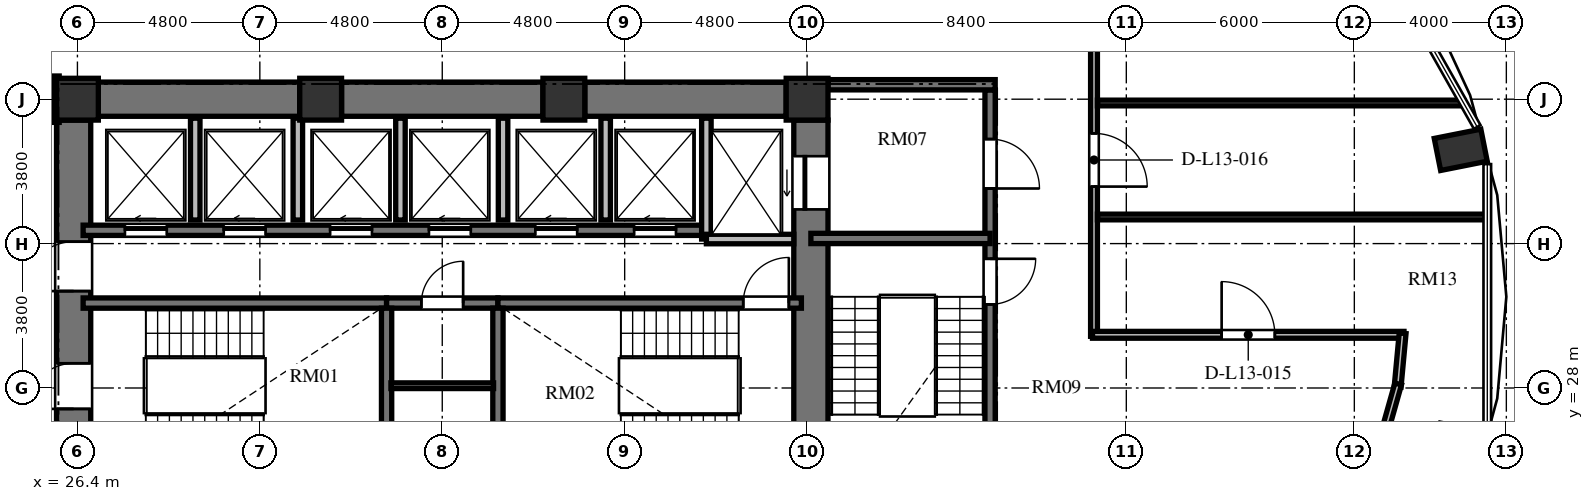
"""IFC4 building model, lengths in metres.
Left out: names, types, materials, properties, quantities, classifications, styles, units other than length and angle.
Written with IfcOpenShell. Run it as: python <this file> out.ifc"""

import sys

from ifc_helpers import new_model, si_unit, direction, frame, frame_2d, origin, origin_2d, place, context, subcontext, project, spatial, rectangle, extrude, element, fill, save


model = new_model("IFC4")
c1 = context("Model", 3, precision=1e-05, world=origin(), true_north=direction((0.0, 1.0)))
c2 = subcontext(c1, "Body", "Model", "MODEL_VIEW")
j1 = project(units=[si_unit("LENGTHUNIT", "METRE"), si_unit("PLANEANGLEUNIT", "RADIAN")], contexts=[c1])
p1 = place(None, origin())
s1 = spatial("IfcSite", under=j1, at=p1, CompositionType="ELEMENT")
p2 = place(p1, origin())
s2 = spatial("IfcBuilding", under=s1, at=p2, CompositionType="ELEMENT")
p3 = place(p2, frame((0.0, 0.0, 54.384)))
s3 = spatial("IfcBuildingStorey", under=s2, at=p3, CompositionType="ELEMENT", Elevation=54.384)
p4 = place(p3, frame((62.8, 34.268, 0.0), z_axis=(0.0, 0.0, 1.0), x_axis=(0.980785280403, 0.195090322016, 0.0)))
e1 = element("IfcColumn", 1, at=p4, inside=s3, PredefinedType="COLUMN", context=c2, shape_type="SweptSolid", body=[
    extrude(rectangle(XDim=1.25, YDim=0.86, at=origin_2d()), origin(), (0.0, 0.0, 1.0), 3.648),
])
for number, where, z_axis, x_axis in (
    (2, (45.6, 35.6, 0.0), (0.0, 0.0, 1.0), (1.0, 0.0, 0.0)),
    (3, (39.2, 35.6, 0.0), (0.0, 0.0, 1.0), (1.0, 0.0, 0.0)),
    (4, (32.8, 35.6, 0.0), (0.0, 0.0, 1.0), (1.0, 0.0, 0.0)),
    (5, (26.4, 35.6, 0.0), (0.0, 0.0, 1.0), (1.0, 0.0, 0.0)),
):
    element("IfcColumn", number, at=place(p3, frame(where, z_axis=z_axis, x_axis=x_axis)), inside=s3, PredefinedType="COLUMN", context=c2, shape_type="SweptSolid", body=[
        extrude(rectangle(XDim=1.1, YDim=1.1, at=origin_2d()), origin(), (0.0, 0.0, 1.0), 3.648),
    ])
p5 = place(p3, frame((26.3, 20.95, 0.0), z_axis=(0.0, 0.0, 1.0), x_axis=(0.0, 1.0, 0.0)))
e6 = element("IfcWall", 6, at=p5, inside=s3, PredefinedType="SHEAR", context=c2, shape_type="SweptSolid", body=[
    extrude(rectangle(XDim=14.1, YDim=0.9, at=frame_2d((7.05, 0.0))), origin(), (0.0, 0.0, 1.0), 3.648),
])
p6 = place(p5, frame((6.5, 0.0, 0.0)))
e7 = element("IfcOpeningElement", 7, at=p6, cuts=e6, PredefinedType="OPENING", context=c2, shape_type="SweptSolid", body=[
    extrude(rectangle(XDim=1.2, YDim=2.15, at=frame_2d((0.6, 1.075))), frame((0.0, 0.46, 0.0), z_axis=(0.0, -1.0, 0.0), x_axis=(1.0, 0.0, 0.0)), (0.0, 0.0, 1.0), 0.92),
])
p7 = place(p5, frame((9.6, 0.0, 0.0)))
e8 = element("IfcOpeningElement", 8, at=p7, cuts=e6, PredefinedType="OPENING", context=c2, shape_type="SweptSolid", body=[
    extrude(rectangle(XDim=1.3, YDim=2.2, at=frame_2d((0.65, 1.1))), frame((0.0, 0.46, 0.0), z_axis=(0.0, -1.0, 0.0), x_axis=(1.0, 0.0, 0.0)), (0.0, 0.0, 1.0), 0.92),
])
p8 = place(p5, frame((3.26, 0.0, 0.0)))
e9 = element("IfcOpeningElement", 9, at=p8, cuts=e6, PredefinedType="OPENING", context=c2, shape_type="SweptSolid", body=[
    extrude(rectangle(XDim=1.3, YDim=2.2, at=frame_2d((0.65, 1.1))), frame((0.0, 0.46, 0.0), z_axis=(0.0, -1.0, 0.0), x_axis=(1.0, 0.0, 0.0)), (0.0, 0.0, 1.0), 0.92),
])
p9 = place(p3, frame((45.7, 20.95, 0.0), z_axis=(0.0, 0.0, 1.0), x_axis=(0.0, 1.0, 0.0)))
e10 = element("IfcWall", 10, at=p9, inside=s3, PredefinedType="SHEAR", context=c2, shape_type="SweptSolid", body=[
    extrude(rectangle(XDim=14.1, YDim=0.9, at=frame_2d((7.05, 0.0))), origin(), (0.0, 0.0, 1.0), 3.648),
])
p10 = place(p9, frame((11.75, 0.0, 0.0)))
e11 = element("IfcOpeningElement", 11, at=p10, cuts=e10, PredefinedType="OPENING", context=c2, shape_type="SweptSolid", body=[
    extrude(rectangle(XDim=1.4, YDim=2.3, at=frame_2d((0.7, 1.15))), frame((0.0, 0.46, 0.0), z_axis=(0.0, -1.0, 0.0), x_axis=(1.0, 0.0, 0.0)), (0.0, 0.0, 1.0), 0.92),
])
p11 = place(p9, frame((0.95, 0.0, 0.0)))
e12 = element("IfcOpeningElement", 12, at=p11, cuts=e10, PredefinedType="OPENING", context=c2, shape_type="SweptSolid", body=[
    extrude(rectangle(XDim=1.4, YDim=2.3, at=frame_2d((0.7, 1.15))), frame((0.0, 0.46, 0.0), z_axis=(0.0, -1.0, 0.0), x_axis=(1.0, 0.0, 0.0)), (0.0, 0.0, 1.0), 0.92),
])
p12 = place(p3, frame((26.95, 35.6, 0.0), z_axis=(0.0, 0.0, 1.0), x_axis=(1.0, 0.0, 0.0)))
e13 = element("IfcWall", 13, at=p12, inside=s3, PredefinedType="SHEAR", context=c2, shape_type="SweptSolid", body=[
    extrude(rectangle(XDim=5.3, YDim=0.9, at=frame_2d((2.65, 0.0))), origin(), (0.0, 0.0, 1.0), 3.648),
])
p13 = place(p3, frame((33.35, 35.6, 0.0), z_axis=(0.0, 0.0, 1.0), x_axis=(1.0, 0.0, 0.0)))
e14 = element("IfcWall", 14, at=p13, inside=s3, PredefinedType="SHEAR", context=c2, shape_type="SweptSolid", body=[
    extrude(rectangle(XDim=5.3, YDim=0.9, at=frame_2d((2.65, 0.0))), origin(), (0.0, 0.0, 1.0), 3.648),
])
p14 = place(p3, frame((39.75, 35.6, 0.0), z_axis=(0.0, 0.0, 1.0), x_axis=(1.0, 0.0, 0.0)))
e15 = element("IfcWall", 15, at=p14, inside=s3, PredefinedType="SHEAR", context=c2, shape_type="SweptSolid", body=[
    extrude(rectangle(XDim=5.3, YDim=0.9, at=frame_2d((2.65, 0.0))), origin(), (0.0, 0.0, 1.0), 3.648),
])
p15 = place(p3, frame((26.55, 30.235, 0.0), z_axis=(0.0, 0.0, 1.0), x_axis=(1.0, 0.0, 0.0)))
e16 = element("IfcWall", 16, at=p15, inside=s3, PredefinedType="SHEAR", context=c2, shape_type="SweptSolid", body=[
    extrude(rectangle(XDim=7.985, YDim=0.27, at=frame_2d((3.992, 0.0))), origin(), (0.0, 0.0, 1.0), 3.648),
])
p16 = place(p3, frame((34.535, 30.235, 0.0), z_axis=(0.0, 0.0, 1.0), x_axis=(1.0, 0.0, 0.0)))
e17 = element("IfcWall", 17, at=p16, inside=s3, PredefinedType="SHEAR", context=c2, shape_type="SweptSolid", body=[
    extrude(rectangle(XDim=2.93, YDim=0.27, at=frame_2d((1.465, 0.0))), origin(), (0.0, 0.0, 1.0), 3.648),
])
p17 = place(p16, frame((0.915, 0.0, 0.0)))
e18 = element("IfcOpeningElement", 18, at=p17, cuts=e17, PredefinedType="OPENING", context=c2, shape_type="SweptSolid", body=[
    extrude(rectangle(XDim=1.1, YDim=2.15, at=frame_2d((0.55, 1.075))), frame((0.0, 0.145, 0.0), z_axis=(0.0, -1.0, 0.0), x_axis=(1.0, 0.0, 0.0)), (0.0, 0.0, 1.0), 0.29),
])
p18 = place(p3, frame((37.465, 30.235, 0.0), z_axis=(0.0, 0.0, 1.0), x_axis=(1.0, 0.0, 0.0)))
e19 = element("IfcWall", 19, at=p18, inside=s3, PredefinedType="SHEAR", context=c2, shape_type="SweptSolid", body=[
    extrude(rectangle(XDim=7.985, YDim=0.27, at=frame_2d((3.992, 0.0))), origin(), (0.0, 0.0, 1.0), 3.648),
])
p19 = place(p18, frame((6.455, 0.0, 0.0)))
e20 = element("IfcOpeningElement", 20, at=p19, cuts=e19, PredefinedType="OPENING", context=c2, shape_type="SweptSolid", body=[
    extrude(rectangle(XDim=1.2, YDim=2.15, at=frame_2d((0.6, 1.075))), frame((0.0, 0.145, 0.0), z_axis=(0.0, -1.0, 0.0), x_axis=(1.0, 0.0, 0.0)), (0.0, 0.0, 1.0), 0.29),
])
for number, where, z_axis, x_axis in (
    (21, (34.535, 26.02, 0.0), (0.0, 0.0, 1.0), (0.0, 1.0, 0.0)),
    (22, (37.465, 26.02, 0.0), (0.0, 0.0, 1.0), (0.0, 1.0, 0.0)),
):
    element("IfcWall", number, at=place(p3, frame(where, z_axis=z_axis, x_axis=x_axis)), inside=s3, PredefinedType="SHEAR", context=c2, shape_type="SweptSolid", body=[
        extrude(rectangle(XDim=4.08, YDim=0.27, at=frame_2d((2.04, 0.0))), origin(), (0.0, 0.0, 1.0), 3.648),
    ])
p20 = place(p3, frame((34.65, 28.06, 0.0), z_axis=(0.0, 0.0, 1.0), x_axis=(1.0, 0.0, 0.0)))
e23 = element("IfcWall", 23, at=p20, inside=s3, PredefinedType="PARTITIONING", context=c2, shape_type="SweptSolid", body=[
    extrude(rectangle(XDim=2.7, YDim=0.15, at=frame_2d((1.35, 0.0))), origin(), (0.0, 0.0, 1.0), 3.428),
])
p21 = place(p3, frame((26.55, 32.15, 0.0), z_axis=(0.0, 0.0, 1.0), x_axis=(1.0, 0.0, 0.0)))
e24 = element("IfcWall", 24, at=p21, inside=s3, PredefinedType="SHEAR", context=c2, shape_type="SweptSolid", body=[
    extrude(rectangle(XDim=16.4, YDim=0.27, at=frame_2d((8.2, 0.0))), origin(), (0.0, 0.0, 1.0), 3.648),
])
p22 = place(p21, frame((1.1, 0.0, 0.0)))
e25 = element("IfcOpeningElement", 25, at=p22, cuts=e24, PredefinedType="OPENING", context=c2, shape_type="SweptSolid", body=[
    extrude(rectangle(XDim=1.1, YDim=2.2, at=frame_2d((0.55, 1.1))), frame((0.0, 0.145, 0.0), z_axis=(0.0, -1.0, 0.0), x_axis=(1.0, 0.0, 0.0)), (0.0, 0.0, 1.0), 0.29),
])
p23 = place(p21, frame((3.7, 0.0, 0.0)))
e26 = element("IfcOpeningElement", 26, at=p23, cuts=e24, PredefinedType="OPENING", context=c2, shape_type="SweptSolid", body=[
    extrude(rectangle(XDim=1.1, YDim=2.2, at=frame_2d((0.55, 1.1))), frame((0.0, 0.145, 0.0), z_axis=(0.0, -1.0, 0.0), x_axis=(1.0, 0.0, 0.0)), (0.0, 0.0, 1.0), 0.29),
])
p24 = place(p21, frame((6.5, 0.0, 0.0)))
e27 = element("IfcOpeningElement", 27, at=p24, cuts=e24, PredefinedType="OPENING", context=c2, shape_type="SweptSolid", body=[
    extrude(rectangle(XDim=1.1, YDim=2.2, at=frame_2d((0.55, 1.1))), frame((0.0, 0.145, 0.0), z_axis=(0.0, -1.0, 0.0), x_axis=(1.0, 0.0, 0.0)), (0.0, 0.0, 1.0), 0.29),
])
p25 = place(p21, frame((9.1, 0.0, 0.0)))
e28 = element("IfcOpeningElement", 28, at=p25, cuts=e24, PredefinedType="OPENING", context=c2, shape_type="SweptSolid", body=[
    extrude(rectangle(XDim=1.1, YDim=2.2, at=frame_2d((0.55, 1.1))), frame((0.0, 0.145, 0.0), z_axis=(0.0, -1.0, 0.0), x_axis=(1.0, 0.0, 0.0)), (0.0, 0.0, 1.0), 0.29),
])
p26 = place(p21, frame((11.9, 0.0, 0.0)))
e29 = element("IfcOpeningElement", 29, at=p26, cuts=e24, PredefinedType="OPENING", context=c2, shape_type="SweptSolid", body=[
    extrude(rectangle(XDim=1.1, YDim=2.2, at=frame_2d((0.55, 1.1))), frame((0.0, 0.145, 0.0), z_axis=(0.0, -1.0, 0.0), x_axis=(1.0, 0.0, 0.0)), (0.0, 0.0, 1.0), 0.29),
])
p27 = place(p21, frame((14.5, 0.0, 0.0)))
e30 = element("IfcOpeningElement", 30, at=p27, cuts=e24, PredefinedType="OPENING", context=c2, shape_type="SweptSolid", body=[
    extrude(rectangle(XDim=1.1, YDim=2.2, at=frame_2d((0.55, 1.1))), frame((0.0, 0.145, 0.0), z_axis=(0.0, -1.0, 0.0), x_axis=(1.0, 0.0, 0.0)), (0.0, 0.0, 1.0), 0.29),
])
p28 = place(p3, frame((42.95, 31.92, 0.0), z_axis=(0.0, 0.0, 1.0), x_axis=(0.0, 1.0, 0.0)))
e31 = element("IfcWall", 31, at=p28, inside=s3, PredefinedType="SOLIDWALL", context=c2, shape_type="SweptSolid", body=[
    extrude(rectangle(XDim=3.18, YDim=0.25, at=frame_2d((1.59, 0.0))), origin(), (0.0, 0.0, 1.0), 3.428),
])
p29 = place(p3, frame((42.95, 31.92, 0.0), z_axis=(0.0, 0.0, 1.0), x_axis=(1.0, 0.0, 0.0)))
e32 = element("IfcWall", 32, at=p29, inside=s3, PredefinedType="SOLIDWALL", context=c2, shape_type="SweptSolid", body=[
    extrude(rectangle(XDim=2.3, YDim=0.25, at=frame_2d((1.15, 0.0))), origin(), (0.0, 0.0, 1.0), 3.428),
])
for number, where, z_axis, x_axis in (
    (33, (29.5, 32.42, 0.0), (0.0, 0.0, 1.0), (0.0, 1.0, 0.0)),
    (34, (32.2, 32.42, 0.0), (0.0, 0.0, 1.0), (0.0, 1.0, 0.0)),
    (35, (34.9, 32.42, 0.0), (0.0, 0.0, 1.0), (0.0, 1.0, 0.0)),
    (36, (37.6, 32.42, 0.0), (0.0, 0.0, 1.0), (0.0, 1.0, 0.0)),
    (37, (40.3, 32.42, 0.0), (0.0, 0.0, 1.0), (0.0, 1.0, 0.0)),
):
    element("IfcWall", number, at=place(p3, frame(where, z_axis=z_axis, x_axis=x_axis)), inside=s3, PredefinedType="SOLIDWALL", context=c2, shape_type="SweptSolid", body=[
        extrude(rectangle(XDim=2.68, YDim=0.25, at=frame_2d((1.34, 0.0))), origin(), (0.0, 0.0, 1.0), 3.428),
    ])
p30 = place(p3, frame((50.415, 35.845, 0.0), z_axis=(0.0, 0.0, 1.0), x_axis=(0.0, -1.0, 0.0)))
e38 = element("IfcWall", 38, at=p30, inside=s3, PredefinedType="SHEAR", context=c2, shape_type="SweptSolid", body=[
    extrude(rectangle(XDim=15.825, YDim=0.27, at=frame_2d((7.913, 0.0))), origin(), (0.0, 0.0, 1.0), 3.648),
])
p31 = place(p30, frame((4.445, 0.0, 0.0)))
e39 = element("IfcOpeningElement", 39, at=p31, cuts=e38, PredefinedType="OPENING", context=c2, shape_type="SweptSolid", body=[
    extrude(rectangle(XDim=1.2, YDim=2.15, at=frame_2d((0.6, 1.075))), frame((0.0, 0.145, 0.0), z_axis=(0.0, -1.0, 0.0), x_axis=(1.0, 0.0, 0.0)), (0.0, 0.0, 1.0), 0.29),
])
p32 = place(p30, frame((1.295, 0.0, 0.0)))
e40 = element("IfcOpeningElement", 40, at=p32, cuts=e38, PredefinedType="OPENING", context=c2, shape_type="SweptSolid", body=[
    extrude(rectangle(XDim=1.3, YDim=2.2, at=frame_2d((0.65, 1.1))), frame((0.0, 0.145, 0.0), z_axis=(0.0, -1.0, 0.0), x_axis=(1.0, 0.0, 0.0)), (0.0, 0.0, 1.0), 0.29),
])
p33 = place(p30, frame((13.095, 0.0, 0.0)))
e41 = element("IfcOpeningElement", 41, at=p33, cuts=e38, PredefinedType="OPENING", context=c2, shape_type="SweptSolid", body=[
    extrude(rectangle(XDim=1.3, YDim=2.2, at=frame_2d((0.65, 1.1))), frame((0.0, 0.145, 0.0), z_axis=(0.0, -1.0, 0.0), x_axis=(1.0, 0.0, 0.0)), (0.0, 0.0, 1.0), 0.29),
])
p34 = place(p3, frame((46.15, 35.98, 0.0), z_axis=(0.0, 0.0, 1.0), x_axis=(1.0, 0.0, 0.0)))
e42 = element("IfcWall", 42, at=p34, inside=s3, PredefinedType="SHEAR", context=c2, shape_type="SweptSolid", body=[
    extrude(rectangle(XDim=4.4, YDim=0.27, at=frame_2d((2.2, 0.0))), origin(), (0.0, 0.0, 1.0), 3.648),
])
p35 = place(p3, frame((45.7, 31.935, 0.0), z_axis=(0.0, 0.0, 1.0), x_axis=(1.0, 0.0, 0.0)))
e43 = element("IfcWall", 43, at=p35, inside=s3, PredefinedType="SHEAR", context=c2, shape_type="SweptSolid", body=[
    extrude(rectangle(XDim=4.715, YDim=0.27, at=frame_2d((2.357, 0.0))), origin(), (0.0, 0.0, 1.0), 3.648),
])
p36 = place(p3, frame((53.15, 38.79, 0.0), z_axis=(0.0, 0.0, 1.0), x_axis=(0.0, -1.0, 0.0)))
e44 = element("IfcWall", 44, at=p36, inside=s3, PredefinedType="PARTITIONING", context=c2, shape_type="SweptSolid", body=[
    extrude(rectangle(XDim=9.43, YDim=0.18, at=frame_2d((4.715, 0.0))), origin(), (0.0, 0.0, 1.0), 3.428),
])
p37 = place(p36, frame((4.09, 0.0, 0.0)))
e45 = element("IfcOpeningElement", 45, at=p37, cuts=e44, PredefinedType="OPENING", context=c2, shape_type="SweptSolid", body=[
    extrude(rectangle(XDim=1.4, YDim=2.2, at=frame_2d((0.7, 1.1))), frame((0.0, 0.1, 0.0), z_axis=(0.0, -1.0, 0.0), x_axis=(1.0, 0.0, 0.0)), (0.0, 0.0, 1.0), 0.2),
])
p38 = place(p3, frame((53.11, 29.4, 0.0), z_axis=(0.0, 0.0, 1.0), x_axis=(1.0, 0.0, 0.0)))
e46 = element("IfcWall", 46, at=p38, inside=s3, PredefinedType="PARTITIONING", context=c2, shape_type="SweptSolid", body=[
    extrude(rectangle(XDim=8.197, YDim=0.18, at=frame_2d((4.098, 0.0))), origin(), (0.0, 0.0, 1.0), 3.428),
])
p39 = place(p38, frame((3.398, 0.0, 0.0)))
e47 = element("IfcOpeningElement", 47, at=p39, cuts=e46, PredefinedType="OPENING", context=c2, shape_type="SweptSolid", body=[
    extrude(rectangle(XDim=1.4, YDim=2.2, at=frame_2d((0.7, 1.1))), frame((0.0, 0.1, 0.0), z_axis=(0.0, -1.0, 0.0), x_axis=(1.0, 0.0, 0.0)), (0.0, 0.0, 1.0), 0.2),
])
p40 = place(p3, frame((61.271, 29.44, 0.0), z_axis=(0.0, 0.0, 1.0), x_axis=(-0.092539930621, -0.995708974169, 0.0)))
e48 = element("IfcWall", 48, at=p40, inside=s3, PredefinedType="PARTITIONING", context=c2, shape_type="SweptSolid", body=[
    extrude(rectangle(XDim=1.417, YDim=0.18, at=frame_2d((0.708, 0.0))), origin(), (0.0, 0.0, 1.0), 3.428),
])
p41 = place(p3, frame((61.154, 28.107, 0.0), z_axis=(0.0, 0.0, 1.0), x_axis=(-0.271748942561, -0.962368179138, 0.0)))
e49 = element("IfcWall", 49, at=p41, inside=s3, PredefinedType="PARTITIONING", context=c2, shape_type="SweptSolid", body=[
    extrude(rectangle(XDim=1.606, YDim=0.18, at=frame_2d((0.803, 0.0))), origin(), (0.0, 0.0, 1.0), 3.428),
])
p42 = place(p3, frame((25.83, 36.21, 0.0), z_axis=(0.0, 0.0, 1.0), x_axis=(0.0, -1.0, 0.0)))
e50 = element("IfcWall", 50, at=p42, inside=s3, PredefinedType="PARTITIONING", context=c2, shape_type="SweptSolid", body=[
    extrude(rectangle(XDim=1.22, YDim=0.18, at=frame_2d((0.61, 0.0))), origin(), (0.0, 0.0, 1.0), 3.428),
])
p43 = place(p3, frame((53.24, 32.5, 0.0), z_axis=(0.0, 0.0, 1.0), x_axis=(1.0, 0.0, 0.0)))
e51 = element("IfcWall", 51, at=p43, inside=s3, PredefinedType="PARTITIONING", context=c2, shape_type="SweptSolid", body=[
    extrude(rectangle(XDim=10.252, YDim=0.15, at=frame_2d((5.126, 0.0))), origin(), (0.0, 0.0, 1.0), 3.428),
])
p44 = place(p3, frame((53.24, 35.5, 0.0), z_axis=(0.0, 0.0, 1.0), x_axis=(1.0, 0.0, 0.0)))
e52 = element("IfcWall", 52, at=p44, inside=s3, PredefinedType="PARTITIONING", context=c2, shape_type="SweptSolid", body=[
    extrude(rectangle(XDim=9.632, YDim=0.15, at=frame_2d((4.816, 0.0))), origin(), (0.0, 0.0, 1.0), 3.428),
])
p45 = place(p6, origin())
e53 = element("IfcDoor", 53, at=p45, inside=s3, OperationType="SINGLE_SWING_LEFT", PredefinedType="DOOR", context=c2, shape_type="SweptSolid", body=[
    extrude(rectangle(XDim=1.2, YDim=2.15, at=frame_2d((0.6, 1.075))), frame((0.0, 0.025, 0.0), z_axis=(0.0, -1.0, 0.0), x_axis=(1.0, 0.0, 0.0)), (0.0, 0.0, 1.0), 0.05),
])
fill(e7, e53)
p46 = place(p19, origin())
e54 = element("IfcDoor", 54, at=p46, inside=s3, OperationType="SINGLE_SWING_RIGHT", PredefinedType="DOOR", context=c2, shape_type="SweptSolid", body=[
    extrude(rectangle(XDim=1.2, YDim=2.15, at=frame_2d((0.6, 1.075))), frame((0.0, 0.025, 0.0), z_axis=(0.0, -1.0, 0.0), x_axis=(1.0, 0.0, 0.0)), (0.0, 0.0, 1.0), 0.05),
])
fill(e20, e54)
p47 = place(p17, origin())
e55 = element("IfcDoor", 55, at=p47, inside=s3, OperationType="SINGLE_SWING_RIGHT", PredefinedType="DOOR", context=c2, shape_type="SweptSolid", body=[
    extrude(rectangle(XDim=1.1, YDim=2.15, at=frame_2d((0.55, 1.075))), frame((0.0, 0.025, 0.0), z_axis=(0.0, -1.0, 0.0), x_axis=(1.0, 0.0, 0.0)), (0.0, 0.0, 1.0), 0.05),
])
fill(e18, e55)
p48 = place(p7, origin())
e56 = element("IfcDoor", 56, at=p48, inside=s3, OperationType="SINGLE_SWING_LEFT", PredefinedType="DOOR", context=c2, shape_type="SweptSolid", body=[
    extrude(rectangle(XDim=1.3, YDim=2.2, at=frame_2d((0.65, 1.1))), frame((0.0, 0.025, 0.0), z_axis=(0.0, -1.0, 0.0), x_axis=(1.0, 0.0, 0.0)), (0.0, 0.0, 1.0), 0.05),
])
fill(e8, e56)
p49 = place(p22, origin())
e57 = element("IfcDoor", 57, at=p49, inside=s3, OperationType="SLIDING_TO_LEFT", PredefinedType="DOOR", context=c2, shape_type="SweptSolid", body=[
    extrude(rectangle(XDim=1.1, YDim=2.2, at=frame_2d((0.55, 1.1))), frame((0.0, 0.025, 0.0), z_axis=(0.0, -1.0, 0.0), x_axis=(1.0, 0.0, 0.0)), (0.0, 0.0, 1.0), 0.05),
])
fill(e25, e57)
p50 = place(p23, origin())
e58 = element("IfcDoor", 58, at=p50, inside=s3, OperationType="SLIDING_TO_LEFT", PredefinedType="DOOR", context=c2, shape_type="SweptSolid", body=[
    extrude(rectangle(XDim=1.1, YDim=2.2, at=frame_2d((0.55, 1.1))), frame((0.0, 0.025, 0.0), z_axis=(0.0, -1.0, 0.0), x_axis=(1.0, 0.0, 0.0)), (0.0, 0.0, 1.0), 0.05),
])
fill(e26, e58)
p51 = place(p24, origin())
e59 = element("IfcDoor", 59, at=p51, inside=s3, OperationType="SLIDING_TO_LEFT", PredefinedType="DOOR", context=c2, shape_type="SweptSolid", body=[
    extrude(rectangle(XDim=1.1, YDim=2.2, at=frame_2d((0.55, 1.1))), frame((0.0, 0.025, 0.0), z_axis=(0.0, -1.0, 0.0), x_axis=(1.0, 0.0, 0.0)), (0.0, 0.0, 1.0), 0.05),
])
fill(e27, e59)
p52 = place(p25, origin())
e60 = element("IfcDoor", 60, at=p52, inside=s3, OperationType="SLIDING_TO_LEFT", PredefinedType="DOOR", context=c2, shape_type="SweptSolid", body=[
    extrude(rectangle(XDim=1.1, YDim=2.2, at=frame_2d((0.55, 1.1))), frame((0.0, 0.025, 0.0), z_axis=(0.0, -1.0, 0.0), x_axis=(1.0, 0.0, 0.0)), (0.0, 0.0, 1.0), 0.05),
])
fill(e28, e60)
p53 = place(p26, origin())
e61 = element("IfcDoor", 61, at=p53, inside=s3, OperationType="SLIDING_TO_LEFT", PredefinedType="DOOR", context=c2, shape_type="SweptSolid", body=[
    extrude(rectangle(XDim=1.1, YDim=2.2, at=frame_2d((0.55, 1.1))), frame((0.0, 0.025, 0.0), z_axis=(0.0, -1.0, 0.0), x_axis=(1.0, 0.0, 0.0)), (0.0, 0.0, 1.0), 0.05),
])
fill(e29, e61)
p54 = place(p27, origin())
e62 = element("IfcDoor", 62, at=p54, inside=s3, OperationType="SLIDING_TO_LEFT", PredefinedType="DOOR", context=c2, shape_type="SweptSolid", body=[
    extrude(rectangle(XDim=1.1, YDim=2.2, at=frame_2d((0.55, 1.1))), frame((0.0, 0.025, 0.0), z_axis=(0.0, -1.0, 0.0), x_axis=(1.0, 0.0, 0.0)), (0.0, 0.0, 1.0), 0.05),
])
fill(e30, e62)
p55 = place(p10, origin())
e63 = element("IfcDoor", 63, at=p55, inside=s3, OperationType="SLIDING_TO_LEFT", PredefinedType="DOOR", context=c2, shape_type="SweptSolid", body=[
    extrude(rectangle(XDim=1.4, YDim=2.3, at=frame_2d((0.7, 1.15))), frame((0.0, 0.025, 0.0), z_axis=(0.0, -1.0, 0.0), x_axis=(1.0, 0.0, 0.0)), (0.0, 0.0, 1.0), 0.05),
])
fill(e11, e63)
p56 = place(p31, origin())
e64 = element("IfcDoor", 64, at=p56, inside=s3, OperationType="SINGLE_SWING_LEFT", PredefinedType="DOOR", context=c2, shape_type="SweptSolid", body=[
    extrude(rectangle(XDim=1.2, YDim=2.15, at=frame_2d((0.6, 1.075))), frame((0.0, 0.025, 0.0), z_axis=(0.0, -1.0, 0.0), x_axis=(1.0, 0.0, 0.0)), (0.0, 0.0, 1.0), 0.05),
])
fill(e39, e64)
p57 = place(p32, origin())
e65 = element("IfcDoor", 65, at=p57, inside=s3, OperationType="SINGLE_SWING_RIGHT", PredefinedType="DOOR", context=c2, shape_type="SweptSolid", body=[
    extrude(rectangle(XDim=1.3, YDim=2.2, at=frame_2d((0.65, 1.1))), frame((0.0, 0.025, 0.0), z_axis=(0.0, -1.0, 0.0), x_axis=(1.0, 0.0, 0.0)), (0.0, 0.0, 1.0), 0.05),
])
fill(e40, e65)
p58 = place(p39, origin())
e66 = element("IfcDoor", 66, at=p58, inside=s3, OperationType="SINGLE_SWING_LEFT", PredefinedType="DOOR", context=c2, shape_type="SweptSolid", body=[
    extrude(rectangle(XDim=1.4, YDim=2.2, at=frame_2d((0.7, 1.1))), frame((0.0, 0.025, 0.0), z_axis=(0.0, -1.0, 0.0), x_axis=(1.0, 0.0, 0.0)), (0.0, 0.0, 1.0), 0.05),
])
fill(e47, e66)
p59 = place(p37, origin())
e67 = element("IfcDoor", 67, at=p59, inside=s3, OperationType="SINGLE_SWING_RIGHT", PredefinedType="DOOR", context=c2, shape_type="SweptSolid", body=[
    extrude(rectangle(XDim=1.4, YDim=2.2, at=frame_2d((0.7, 1.1))), frame((0.0, 0.025, 0.0), z_axis=(0.0, -1.0, 0.0), x_axis=(1.0, 0.0, 0.0)), (0.0, 0.0, 1.0), 0.05),
])
fill(e45, e67)
save(model, sys.argv[1])
